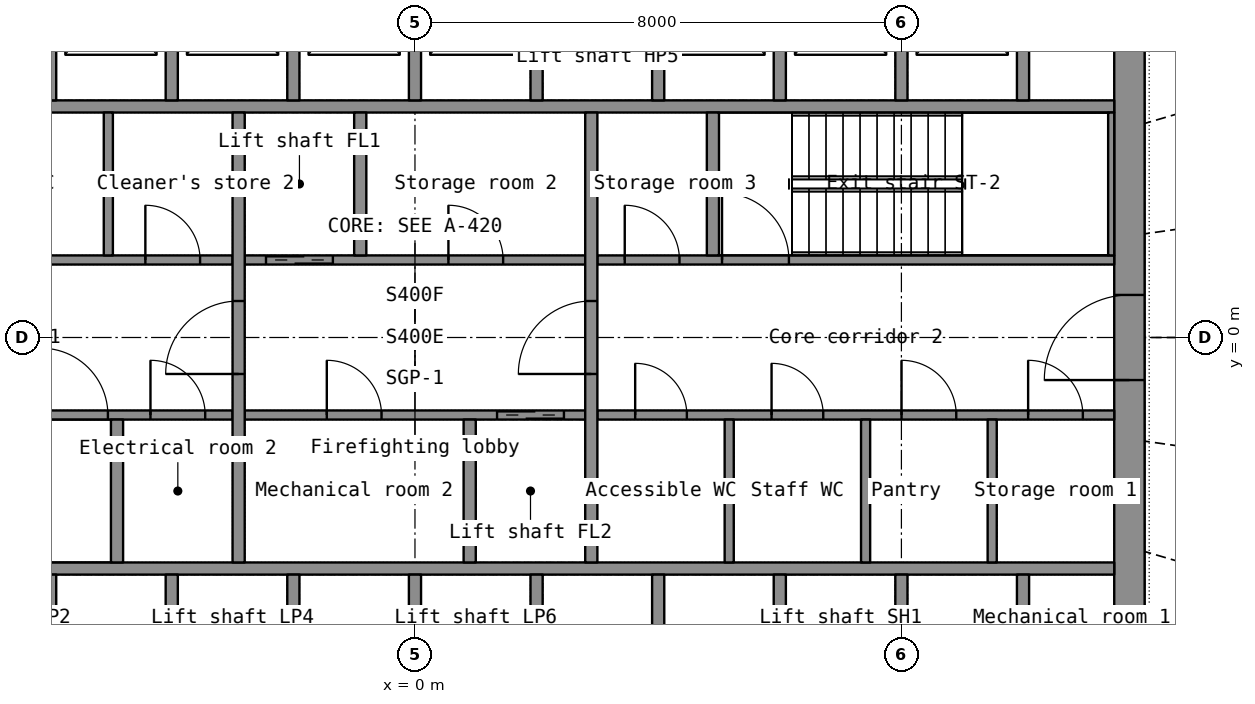
"""IFC4 building model, lengths in metres.
Left out: names, types, materials, properties, quantities, classifications, styles, units other than length and angle.
Written with IfcOpenShell. Run it as: python <this file> out.ifc"""

import sys

from ifc_helpers import new_model, si_unit, direction, frame, frame_2d, origin, place, context, subcontext, project, spatial, rectangle, extrude, element, fill, save


model = new_model("IFC4")
c1 = context("Model", 3, precision=1e-05, world=origin(), true_north=direction((0.0, 1.0)))
c2 = subcontext(c1, "Body", "Model", "MODEL_VIEW")
j1 = project(units=[si_unit("LENGTHUNIT", "METRE"), si_unit("PLANEANGLEUNIT", "RADIAN")], contexts=[c1])
p1 = place(None, origin())
s1 = spatial("IfcSite", under=j1, at=p1, CompositionType="ELEMENT")
p2 = place(p1, origin())
s2 = spatial("IfcBuilding", under=s1, at=p2, CompositionType="ELEMENT")
p3 = place(p2, frame((0.0, 0.0, 145.2)))
s3 = spatial("IfcBuildingStorey", under=s2, at=p3, CompositionType="ELEMENT", Elevation=145.2)
p4 = place(p3, frame((11.75, -7.2, 0.0), z_axis=(0.0, 0.0, 1.0), x_axis=(0.0, 1.0, 0.0)))
e1 = element("IfcWall", 1, at=p4, inside=s3, PredefinedType="SHEAR", context=c2, shape_type="SweptSolid", body=[
    extrude(rectangle(XDim=14.4, YDim=0.5, at=frame_2d((7.2, 0.0))), origin(), (0.0, 0.0, 1.0), 7.0),
])
p5 = place(p4, frame((6.5, 0.0, 0.0)))
e2 = element("IfcOpeningElement", 2, at=p5, cuts=e1, PredefinedType="OPENING", context=c2, shape_type="SweptSolid", body=[
    extrude(rectangle(XDim=1.4, YDim=2.2, at=frame_2d((0.7, 1.1))), frame((0.0, 0.26, 0.0), z_axis=(0.0, -1.0, 0.0), x_axis=(1.0, 0.0, 0.0)), (0.0, 0.0, 1.0), 0.52),
])
for number, where, z_axis, x_axis in (
    (3, (-11.5, -3.8, 0.0), (0.0, 0.0, 1.0), (1.0, 0.0, 0.0)),
    (4, (-11.5, 3.8, 0.0), (0.0, 0.0, 1.0), (1.0, 0.0, 0.0)),
):
    element("IfcWall", number, at=place(p3, frame(where, z_axis=z_axis, x_axis=x_axis)), inside=s3, PredefinedType="SHEAR", context=c2, shape_type="SweptSolid", body=[
        extrude(rectangle(XDim=23.0, YDim=0.2, at=frame_2d((11.5, 0.0))), origin(), (0.0, 0.0, 1.0), 7.0),
    ])
for number, where, z_axis, x_axis in (
    (5, (-6.0, -6.7, 0.0), (0.0, 0.0, 1.0), (0.0, 1.0, 0.0)),
    (6, (-4.0, -6.7, 0.0), (0.0, 0.0, 1.0), (0.0, 1.0, 0.0)),
    (7, (-2.0, -6.7, 0.0), (0.0, 0.0, 1.0), (0.0, 1.0, 0.0)),
    (8, (0.0, -6.7, 0.0), (0.0, 0.0, 1.0), (0.0, 1.0, 0.0)),
    (9, (2.0, -6.7, 0.0), (0.0, 0.0, 1.0), (0.0, 1.0, 0.0)),
    (10, (4.0, -6.7, 0.0), (0.0, 0.0, 1.0), (0.0, 1.0, 0.0)),
    (11, (6.0, -6.7, 0.0), (0.0, 0.0, 1.0), (0.0, 1.0, 0.0)),
    (12, (8.0, -6.7, 0.0), (0.0, 0.0, 1.0), (0.0, 1.0, 0.0)),
    (13, (10.0, -6.7, 0.0), (0.0, 0.0, 1.0), (0.0, 1.0, 0.0)),
    (14, (-6.0, 3.9, 0.0), (0.0, 0.0, 1.0), (0.0, 1.0, 0.0)),
    (15, (-4.0, 3.9, 0.0), (0.0, 0.0, 1.0), (0.0, 1.0, 0.0)),
    (16, (-2.0, 3.9, 0.0), (0.0, 0.0, 1.0), (0.0, 1.0, 0.0)),
    (17, (0.0, 3.9, 0.0), (0.0, 0.0, 1.0), (0.0, 1.0, 0.0)),
    (18, (2.0, 3.9, 0.0), (0.0, 0.0, 1.0), (0.0, 1.0, 0.0)),
    (19, (4.0, 3.9, 0.0), (0.0, 0.0, 1.0), (0.0, 1.0, 0.0)),
    (20, (6.0, 3.9, 0.0), (0.0, 0.0, 1.0), (0.0, 1.0, 0.0)),
    (21, (8.0, 3.9, 0.0), (0.0, 0.0, 1.0), (0.0, 1.0, 0.0)),
    (22, (10.0, 3.9, 0.0), (0.0, 0.0, 1.0), (0.0, 1.0, 0.0)),
):
    element("IfcWall", number, at=place(p3, frame(where, z_axis=z_axis, x_axis=x_axis)), inside=s3, PredefinedType="SHEAR", context=c2, shape_type="SweptSolid", body=[
        extrude(rectangle(XDim=2.8, YDim=0.2, at=frame_2d((1.4, 0.0))), origin(), (0.0, 0.0, 1.0), 7.0),
    ])
p6 = place(p3, frame((-11.5, -1.275, 0.0), z_axis=(0.0, 0.0, 1.0), x_axis=(1.0, 0.0, 0.0)))
e23 = element("IfcWall", 23, at=p6, inside=s3, PredefinedType="SHEAR", context=c2, shape_type="SweptSolid", body=[
    extrude(rectangle(XDim=8.5, YDim=0.15, at=frame_2d((4.25, 0.0))), origin(), (0.0, 0.0, 1.0), 7.0),
])
p7 = place(p6, frame((5.35, 0.0, 0.0)))
e24 = element("IfcOpeningElement", 24, at=p7, cuts=e23, PredefinedType="OPENING", context=c2, shape_type="SweptSolid", body=[
    extrude(rectangle(XDim=1.1, YDim=2.15, at=frame_2d((0.55, 1.075))), frame((0.0, 0.085, 0.0), z_axis=(0.0, -1.0, 0.0), x_axis=(1.0, 0.0, 0.0)), (0.0, 0.0, 1.0), 0.17),
])
p8 = place(p6, frame((7.15, 0.0, 0.0)))
e25 = element("IfcOpeningElement", 25, at=p8, cuts=e23, PredefinedType="OPENING", context=c2, shape_type="SweptSolid", body=[
    extrude(rectangle(XDim=0.9, YDim=2.1, at=frame_2d((0.45, 1.05))), frame((0.0, 0.085, 0.0), z_axis=(0.0, -1.0, 0.0), x_axis=(1.0, 0.0, 0.0)), (0.0, 0.0, 1.0), 0.17),
])
p9 = place(p3, frame((-2.8, -1.275, 0.0), z_axis=(0.0, 0.0, 1.0), x_axis=(1.0, 0.0, 0.0)))
e26 = element("IfcWall", 26, at=p9, inside=s3, PredefinedType="SHEAR", context=c2, shape_type="SweptSolid", body=[
    extrude(rectangle(XDim=5.6, YDim=0.15, at=frame_2d((2.8, 0.0))), origin(), (0.0, 0.0, 1.0), 7.0),
])
p10 = place(p9, frame((4.15, 0.0, 0.0)))
e27 = element("IfcOpeningElement", 27, at=p10, cuts=e26, PredefinedType="OPENING", context=c2, shape_type="SweptSolid", body=[
    extrude(rectangle(XDim=1.1, YDim=2.2, at=frame_2d((0.55, 1.1))), frame((0.0, 0.085, 0.0), z_axis=(0.0, -1.0, 0.0), x_axis=(1.0, 0.0, 0.0)), (0.0, 0.0, 1.0), 0.17),
])
p11 = place(p9, frame((1.35, 0.0, 0.0)))
e28 = element("IfcOpeningElement", 28, at=p11, cuts=e26, PredefinedType="OPENING", context=c2, shape_type="SweptSolid", body=[
    extrude(rectangle(XDim=0.9, YDim=2.1, at=frame_2d((0.45, 1.05))), frame((0.0, 0.085, 0.0), z_axis=(0.0, -1.0, 0.0), x_axis=(1.0, 0.0, 0.0)), (0.0, 0.0, 1.0), 0.17),
])
p12 = place(p3, frame((3.0, -1.275, 0.0), z_axis=(0.0, 0.0, 1.0), x_axis=(1.0, 0.0, 0.0)))
e29 = element("IfcWall", 29, at=p12, inside=s3, PredefinedType="PARTITIONING", context=c2, shape_type="SweptSolid", body=[
    extrude(rectangle(XDim=8.5, YDim=0.15, at=frame_2d((4.25, 0.0))), origin(), (0.0, 0.0, 1.0), 7.0),
])
p13 = place(p12, frame((0.622, 0.0, 0.0)))
e30 = element("IfcOpeningElement", 30, at=p13, cuts=e29, PredefinedType="OPENING", context=c2, shape_type="SweptSolid", body=[
    extrude(rectangle(XDim=0.85, YDim=2.1, at=frame_2d((0.425, 1.05))), frame((0.0, 0.085, 0.0), z_axis=(0.0, -1.0, 0.0), x_axis=(1.0, 0.0, 0.0)), (0.0, 0.0, 1.0), 0.17),
])
p14 = place(p12, frame((2.865, 0.0, 0.0)))
e31 = element("IfcOpeningElement", 31, at=p14, cuts=e29, PredefinedType="OPENING", context=c2, shape_type="SweptSolid", body=[
    extrude(rectangle(XDim=0.85, YDim=2.1, at=frame_2d((0.425, 1.05))), frame((0.0, 0.085, 0.0), z_axis=(0.0, -1.0, 0.0), x_axis=(1.0, 0.0, 0.0)), (0.0, 0.0, 1.0), 0.17),
])
p15 = place(p12, frame((5.002, 0.0, 0.0)))
e32 = element("IfcOpeningElement", 32, at=p15, cuts=e29, PredefinedType="OPENING", context=c2, shape_type="SweptSolid", body=[
    extrude(rectangle(XDim=0.9, YDim=2.1, at=frame_2d((0.45, 1.05))), frame((0.0, 0.085, 0.0), z_axis=(0.0, -1.0, 0.0), x_axis=(1.0, 0.0, 0.0)), (0.0, 0.0, 1.0), 0.17),
])
p16 = place(p12, frame((7.084, 0.0, 0.0)))
e33 = element("IfcOpeningElement", 33, at=p16, cuts=e29, PredefinedType="OPENING", context=c2, shape_type="SweptSolid", body=[
    extrude(rectangle(XDim=0.9, YDim=2.1, at=frame_2d((0.45, 1.05))), frame((0.0, 0.085, 0.0), z_axis=(0.0, -1.0, 0.0), x_axis=(1.0, 0.0, 0.0)), (0.0, 0.0, 1.0), 0.17),
])
p17 = place(p3, frame((-11.5, 1.275, 0.0), z_axis=(0.0, 0.0, 1.0), x_axis=(1.0, 0.0, 0.0)))
e34 = element("IfcWall", 34, at=p17, inside=s3, PredefinedType="PARTITIONING", context=c2, shape_type="SweptSolid", body=[
    extrude(rectangle(XDim=8.5, YDim=0.15, at=frame_2d((4.25, 0.0))), origin(), (0.0, 0.0, 1.0), 7.0),
])
p18 = place(p17, frame((1.133, 0.0, 0.0)))
e35 = element("IfcOpeningElement", 35, at=p18, cuts=e34, PredefinedType="OPENING", context=c2, shape_type="SweptSolid", body=[
    extrude(rectangle(XDim=0.85, YDim=2.1, at=frame_2d((0.425, 1.05))), frame((0.0, 0.085, 0.0), z_axis=(0.0, -1.0, 0.0), x_axis=(1.0, 0.0, 0.0)), (0.0, 0.0, 1.0), 0.17),
])
p19 = place(p17, frame((4.399, 0.0, 0.0)))
e36 = element("IfcOpeningElement", 36, at=p19, cuts=e34, PredefinedType="OPENING", context=c2, shape_type="SweptSolid", body=[
    extrude(rectangle(XDim=0.85, YDim=2.1, at=frame_2d((0.425, 1.05))), frame((0.0, 0.085, 0.0), z_axis=(0.0, -1.0, 0.0), x_axis=(1.0, 0.0, 0.0)), (0.0, 0.0, 1.0), 0.17),
])
p20 = place(p17, frame((7.066, 0.0, 0.0)))
e37 = element("IfcOpeningElement", 37, at=p20, cuts=e34, PredefinedType="OPENING", context=c2, shape_type="SweptSolid", body=[
    extrude(rectangle(XDim=0.9, YDim=2.1, at=frame_2d((0.45, 1.05))), frame((0.0, 0.085, 0.0), z_axis=(0.0, -1.0, 0.0), x_axis=(1.0, 0.0, 0.0)), (0.0, 0.0, 1.0), 0.17),
])
p21 = place(p3, frame((-2.8, 1.275, 0.0), z_axis=(0.0, 0.0, 1.0), x_axis=(1.0, 0.0, 0.0)))
e38 = element("IfcWall", 38, at=p21, inside=s3, PredefinedType="SHEAR", context=c2, shape_type="SweptSolid", body=[
    extrude(rectangle(XDim=5.6, YDim=0.15, at=frame_2d((2.8, 0.0))), origin(), (0.0, 0.0, 1.0), 7.0),
])
p22 = place(p21, frame((0.35, 0.0, 0.0)))
e39 = element("IfcOpeningElement", 39, at=p22, cuts=e38, PredefinedType="OPENING", context=c2, shape_type="SweptSolid", body=[
    extrude(rectangle(XDim=1.1, YDim=2.2, at=frame_2d((0.55, 1.1))), frame((0.0, 0.085, 0.0), z_axis=(0.0, -1.0, 0.0), x_axis=(1.0, 0.0, 0.0)), (0.0, 0.0, 1.0), 0.17),
])
p23 = place(p21, frame((3.35, 0.0, 0.0)))
e40 = element("IfcOpeningElement", 40, at=p23, cuts=e38, PredefinedType="OPENING", context=c2, shape_type="SweptSolid", body=[
    extrude(rectangle(XDim=0.9, YDim=2.1, at=frame_2d((0.45, 1.05))), frame((0.0, 0.085, 0.0), z_axis=(0.0, -1.0, 0.0), x_axis=(1.0, 0.0, 0.0)), (0.0, 0.0, 1.0), 0.17),
])
p24 = place(p3, frame((3.0, 1.275, 0.0), z_axis=(0.0, 0.0, 1.0), x_axis=(1.0, 0.0, 0.0)))
e41 = element("IfcWall", 41, at=p24, inside=s3, PredefinedType="SHEAR", context=c2, shape_type="SweptSolid", body=[
    extrude(rectangle(XDim=8.5, YDim=0.15, at=frame_2d((4.25, 0.0))), origin(), (0.0, 0.0, 1.0), 7.0),
])
p25 = place(p24, frame((2.05, 0.0, 0.0)))
e42 = element("IfcOpeningElement", 42, at=p25, cuts=e41, PredefinedType="OPENING", context=c2, shape_type="SweptSolid", body=[
    extrude(rectangle(XDim=1.1, YDim=2.15, at=frame_2d((0.55, 1.075))), frame((0.0, 0.085, 0.0), z_axis=(0.0, -1.0, 0.0), x_axis=(1.0, 0.0, 0.0)), (0.0, 0.0, 1.0), 0.17),
])
p26 = place(p24, frame((0.45, 0.0, 0.0)))
e43 = element("IfcOpeningElement", 43, at=p26, cuts=e41, PredefinedType="OPENING", context=c2, shape_type="SweptSolid", body=[
    extrude(rectangle(XDim=0.9, YDim=2.1, at=frame_2d((0.45, 1.05))), frame((0.0, 0.085, 0.0), z_axis=(0.0, -1.0, 0.0), x_axis=(1.0, 0.0, 0.0)), (0.0, 0.0, 1.0), 0.17),
])
p27 = place(p3, frame((-2.9, -3.7, 0.0), z_axis=(0.0, 0.0, 1.0), x_axis=(0.0, 1.0, 0.0)))
e44 = element("IfcWall", 44, at=p27, inside=s3, PredefinedType="SHEAR", context=c2, shape_type="SweptSolid", body=[
    extrude(rectangle(XDim=7.4, YDim=0.2, at=frame_2d((3.7, 0.0))), origin(), (0.0, 0.0, 1.0), 7.0),
])
p28 = place(p27, frame((3.1, 0.0, 0.0)))
e45 = element("IfcOpeningElement", 45, at=p28, cuts=e44, PredefinedType="OPENING", context=c2, shape_type="SweptSolid", body=[
    extrude(rectangle(XDim=1.2, YDim=2.2, at=frame_2d((0.6, 1.1))), frame((0.0, 0.11, 0.0), z_axis=(0.0, -1.0, 0.0), x_axis=(1.0, 0.0, 0.0)), (0.0, 0.0, 1.0), 0.22),
])
p29 = place(p3, frame((2.9, -3.7, 0.0), z_axis=(0.0, 0.0, 1.0), x_axis=(0.0, 1.0, 0.0)))
e46 = element("IfcWall", 46, at=p29, inside=s3, PredefinedType="SHEAR", context=c2, shape_type="SweptSolid", body=[
    extrude(rectangle(XDim=7.4, YDim=0.2, at=frame_2d((3.7, 0.0))), origin(), (0.0, 0.0, 1.0), 7.0),
])
p30 = place(p29, frame((3.1, 0.0, 0.0)))
e47 = element("IfcOpeningElement", 47, at=p30, cuts=e46, PredefinedType="OPENING", context=c2, shape_type="SweptSolid", body=[
    extrude(rectangle(XDim=1.2, YDim=2.2, at=frame_2d((0.6, 1.1))), frame((0.0, 0.11, 0.0), z_axis=(0.0, -1.0, 0.0), x_axis=(1.0, 0.0, 0.0)), (0.0, 0.0, 1.0), 0.22),
])
for number, where, z_axis, x_axis in (
    (48, (-0.9, 1.35, 0.0), (0.0, 0.0, 1.0), (0.0, 1.0, 0.0)),
    (49, (0.9, -3.7, 0.0), (0.0, 0.0, 1.0), (0.0, 1.0, 0.0)),
):
    element("IfcWall", number, at=place(p3, frame(where, z_axis=z_axis, x_axis=x_axis)), inside=s3, PredefinedType="SHEAR", context=c2, shape_type="SweptSolid", body=[
        extrude(rectangle(XDim=2.35, YDim=0.2, at=frame_2d((1.175, 0.0))), origin(), (0.0, 0.0, 1.0), 7.0),
    ])
p31 = place(p3, frame((11.45, 1.35, 0.0), z_axis=(0.0, 0.0, 1.0), x_axis=(0.0, 1.0, 0.0)))
e50 = element("IfcWall", 50, at=p31, inside=s3, PredefinedType="SHEAR", context=c2, shape_type="SweptSolid", body=[
    extrude(rectangle(XDim=2.35, YDim=0.1, at=frame_2d((1.175, 0.0))), origin(), (0.0, 0.0, 1.0), 7.0),
])
for number, where, z_axis, x_axis in (
    (51, (-4.9, -3.7, 0.0), (0.0, 0.0, 1.0), (0.0, 1.0, 0.0)),
    (52, (4.9, 1.35, 0.0), (0.0, 0.0, 1.0), (0.0, 1.0, 0.0)),
):
    element("IfcWall", number, at=place(p3, frame(where, z_axis=z_axis, x_axis=x_axis)), inside=s3, PredefinedType="SHEAR", context=c2, shape_type="SweptSolid", body=[
        extrude(rectangle(XDim=2.35, YDim=0.2, at=frame_2d((1.175, 0.0))), origin(), (0.0, 0.0, 1.0), 7.0),
    ])
for number, where, z_axis, x_axis in (
    (53, (-5.043, 1.35, 0.0), (0.0, 0.0, 1.0), (0.0, 1.0, 0.0)),
    (54, (5.168, -3.7, 0.0), (0.0, 0.0, 1.0), (0.0, 1.0, 0.0)),
    (55, (7.411, -3.7, 0.0), (0.0, 0.0, 1.0), (0.0, 1.0, 0.0)),
    (56, (9.493, -3.7, 0.0), (0.0, 0.0, 1.0), (0.0, 1.0, 0.0)),
):
    element("IfcWall", number, at=place(p3, frame(where, z_axis=z_axis, x_axis=x_axis)), inside=s3, PredefinedType="PARTITIONING", context=c2, shape_type="SweptSolid", body=[
        extrude(rectangle(XDim=2.35, YDim=0.15, at=frame_2d((1.175, 0.0))), origin(), (0.0, 0.0, 1.0), 7.0),
    ])
p32 = place(p5, origin())
e57 = element("IfcDoor", 57, at=p32, inside=s3, OperationType="DOUBLE_DOOR_SINGLE_SWING", PredefinedType="DOOR", context=c2, shape_type="SweptSolid", body=[
    extrude(rectangle(XDim=1.4, YDim=2.2, at=frame_2d((0.7, 1.1))), frame((0.0, 0.025, 0.0), z_axis=(0.0, -1.0, 0.0), x_axis=(1.0, 0.0, 0.0)), (0.0, 0.0, 1.0), 0.05),
])
fill(e2, e57)
p33 = place(p28, origin())
e58 = element("IfcDoor", 58, at=p33, inside=s3, OperationType="SINGLE_SWING_LEFT", PredefinedType="DOOR", context=c2, shape_type="SweptSolid", body=[
    extrude(rectangle(XDim=1.2, YDim=2.2, at=frame_2d((0.6, 1.1))), frame((0.0, 0.025, 0.0), z_axis=(0.0, -1.0, 0.0), x_axis=(1.0, 0.0, 0.0)), (0.0, 0.0, 1.0), 0.05),
])
fill(e45, e58)
p34 = place(p30, origin())
e59 = element("IfcDoor", 59, at=p34, inside=s3, OperationType="SINGLE_SWING_LEFT", PredefinedType="DOOR", context=c2, shape_type="SweptSolid", body=[
    extrude(rectangle(XDim=1.2, YDim=2.2, at=frame_2d((0.6, 1.1))), frame((0.0, 0.025, 0.0), z_axis=(0.0, -1.0, 0.0), x_axis=(1.0, 0.0, 0.0)), (0.0, 0.0, 1.0), 0.05),
])
fill(e47, e59)
p35 = place(p22, origin())
e60 = element("IfcDoor", 60, at=p35, inside=s3, OperationType="DOUBLE_DOOR_SLIDING", PredefinedType="DOOR", context=c2, shape_type="SweptSolid", body=[
    extrude(rectangle(XDim=1.1, YDim=2.2, at=frame_2d((0.55, 1.1))), frame((0.0, 0.025, 0.0), z_axis=(0.0, -1.0, 0.0), x_axis=(1.0, 0.0, 0.0)), (0.0, 0.0, 1.0), 0.05),
])
fill(e39, e60)
p36 = place(p10, origin())
e61 = element("IfcDoor", 61, at=p36, inside=s3, OperationType="DOUBLE_DOOR_SLIDING", PredefinedType="DOOR", context=c2, shape_type="SweptSolid", body=[
    extrude(rectangle(XDim=1.1, YDim=2.2, at=frame_2d((0.55, 1.1))), frame((0.0, 0.025, 0.0), z_axis=(0.0, -1.0, 0.0), x_axis=(1.0, 0.0, 0.0)), (0.0, 0.0, 1.0), 0.05),
])
fill(e27, e61)
p37 = place(p7, origin())
e62 = element("IfcDoor", 62, at=p37, inside=s3, OperationType="SINGLE_SWING_LEFT", PredefinedType="DOOR", context=c2, shape_type="SweptSolid", body=[
    extrude(rectangle(XDim=1.1, YDim=2.15, at=frame_2d((0.55, 1.075))), frame((0.0, 0.025, 0.0), z_axis=(0.0, -1.0, 0.0), x_axis=(1.0, 0.0, 0.0)), (0.0, 0.0, 1.0), 0.05),
])
fill(e24, e62)
p38 = place(p25, origin())
e63 = element("IfcDoor", 63, at=p38, inside=s3, OperationType="SINGLE_SWING_LEFT", PredefinedType="DOOR", context=c2, shape_type="SweptSolid", body=[
    extrude(rectangle(XDim=1.1, YDim=2.15, at=frame_2d((0.55, 1.075))), frame((0.0, 0.025, 0.0), z_axis=(0.0, -1.0, 0.0), x_axis=(1.0, 0.0, 0.0)), (0.0, 0.0, 1.0), 0.05),
])
fill(e42, e63)
p39 = place(p20, origin())
e64 = element("IfcDoor", 64, at=p39, inside=s3, OperationType="SINGLE_SWING_LEFT", PredefinedType="DOOR", context=c2, shape_type="SweptSolid", body=[
    extrude(rectangle(XDim=0.9, YDim=2.1, at=frame_2d((0.45, 1.05))), frame((0.0, 0.025, 0.0), z_axis=(0.0, -1.0, 0.0), x_axis=(1.0, 0.0, 0.0)), (0.0, 0.0, 1.0), 0.05),
])
fill(e37, e64)
p40 = place(p13, origin())
e65 = element("IfcDoor", 65, at=p40, inside=s3, OperationType="SINGLE_SWING_LEFT", PredefinedType="DOOR", context=c2, shape_type="SweptSolid", body=[
    extrude(rectangle(XDim=0.85, YDim=2.1, at=frame_2d((0.425, 1.05))), frame((0.0, 0.025, 0.0), z_axis=(0.0, -1.0, 0.0), x_axis=(1.0, 0.0, 0.0)), (0.0, 0.0, 1.0), 0.05),
])
fill(e30, e65)
p41 = place(p14, origin())
e66 = element("IfcDoor", 66, at=p41, inside=s3, OperationType="SINGLE_SWING_LEFT", PredefinedType="DOOR", context=c2, shape_type="SweptSolid", body=[
    extrude(rectangle(XDim=0.85, YDim=2.1, at=frame_2d((0.425, 1.05))), frame((0.0, 0.025, 0.0), z_axis=(0.0, -1.0, 0.0), x_axis=(1.0, 0.0, 0.0)), (0.0, 0.0, 1.0), 0.05),
])
fill(e31, e66)
p42 = place(p15, origin())
e67 = element("IfcDoor", 67, at=p42, inside=s3, OperationType="SINGLE_SWING_LEFT", PredefinedType="DOOR", context=c2, shape_type="SweptSolid", body=[
    extrude(rectangle(XDim=0.9, YDim=2.1, at=frame_2d((0.45, 1.05))), frame((0.0, 0.025, 0.0), z_axis=(0.0, -1.0, 0.0), x_axis=(1.0, 0.0, 0.0)), (0.0, 0.0, 1.0), 0.05),
])
fill(e32, e67)
p43 = place(p16, origin())
e68 = element("IfcDoor", 68, at=p43, inside=s3, OperationType="SINGLE_SWING_LEFT", PredefinedType="DOOR", context=c2, shape_type="SweptSolid", body=[
    extrude(rectangle(XDim=0.9, YDim=2.1, at=frame_2d((0.45, 1.05))), frame((0.0, 0.025, 0.0), z_axis=(0.0, -1.0, 0.0), x_axis=(1.0, 0.0, 0.0)), (0.0, 0.0, 1.0), 0.05),
])
fill(e33, e68)
p44 = place(p23, origin())
e69 = element("IfcDoor", 69, at=p44, inside=s3, OperationType="SINGLE_SWING_LEFT", PredefinedType="DOOR", context=c2, shape_type="SweptSolid", body=[
    extrude(rectangle(XDim=0.9, YDim=2.1, at=frame_2d((0.45, 1.05))), frame((0.0, 0.025, 0.0), z_axis=(0.0, -1.0, 0.0), x_axis=(1.0, 0.0, 0.0)), (0.0, 0.0, 1.0), 0.05),
])
fill(e40, e69)
p45 = place(p11, origin())
e70 = element("IfcDoor", 70, at=p45, inside=s3, OperationType="SINGLE_SWING_LEFT", PredefinedType="DOOR", context=c2, shape_type="SweptSolid", body=[
    extrude(rectangle(XDim=0.9, YDim=2.1, at=frame_2d((0.45, 1.05))), frame((0.0, 0.025, 0.0), z_axis=(0.0, -1.0, 0.0), x_axis=(1.0, 0.0, 0.0)), (0.0, 0.0, 1.0), 0.05),
])
fill(e28, e70)
p46 = place(p26, origin())
e71 = element("IfcDoor", 71, at=p46, inside=s3, OperationType="SINGLE_SWING_LEFT", PredefinedType="DOOR", context=c2, shape_type="SweptSolid", body=[
    extrude(rectangle(XDim=0.9, YDim=2.1, at=frame_2d((0.45, 1.05))), frame((0.0, 0.025, 0.0), z_axis=(0.0, -1.0, 0.0), x_axis=(1.0, 0.0, 0.0)), (0.0, 0.0, 1.0), 0.05),
])
fill(e43, e71)
p47 = place(p8, origin())
e72 = element("IfcDoor", 72, at=p47, inside=s3, OperationType="SINGLE_SWING_LEFT", PredefinedType="DOOR", context=c2, shape_type="SweptSolid", body=[
    extrude(rectangle(XDim=0.9, YDim=2.1, at=frame_2d((0.45, 1.05))), frame((0.0, 0.025, 0.0), z_axis=(0.0, -1.0, 0.0), x_axis=(1.0, 0.0, 0.0)), (0.0, 0.0, 1.0), 0.05),
])
fill(e25, e72)
save(model, sys.argv[1])
